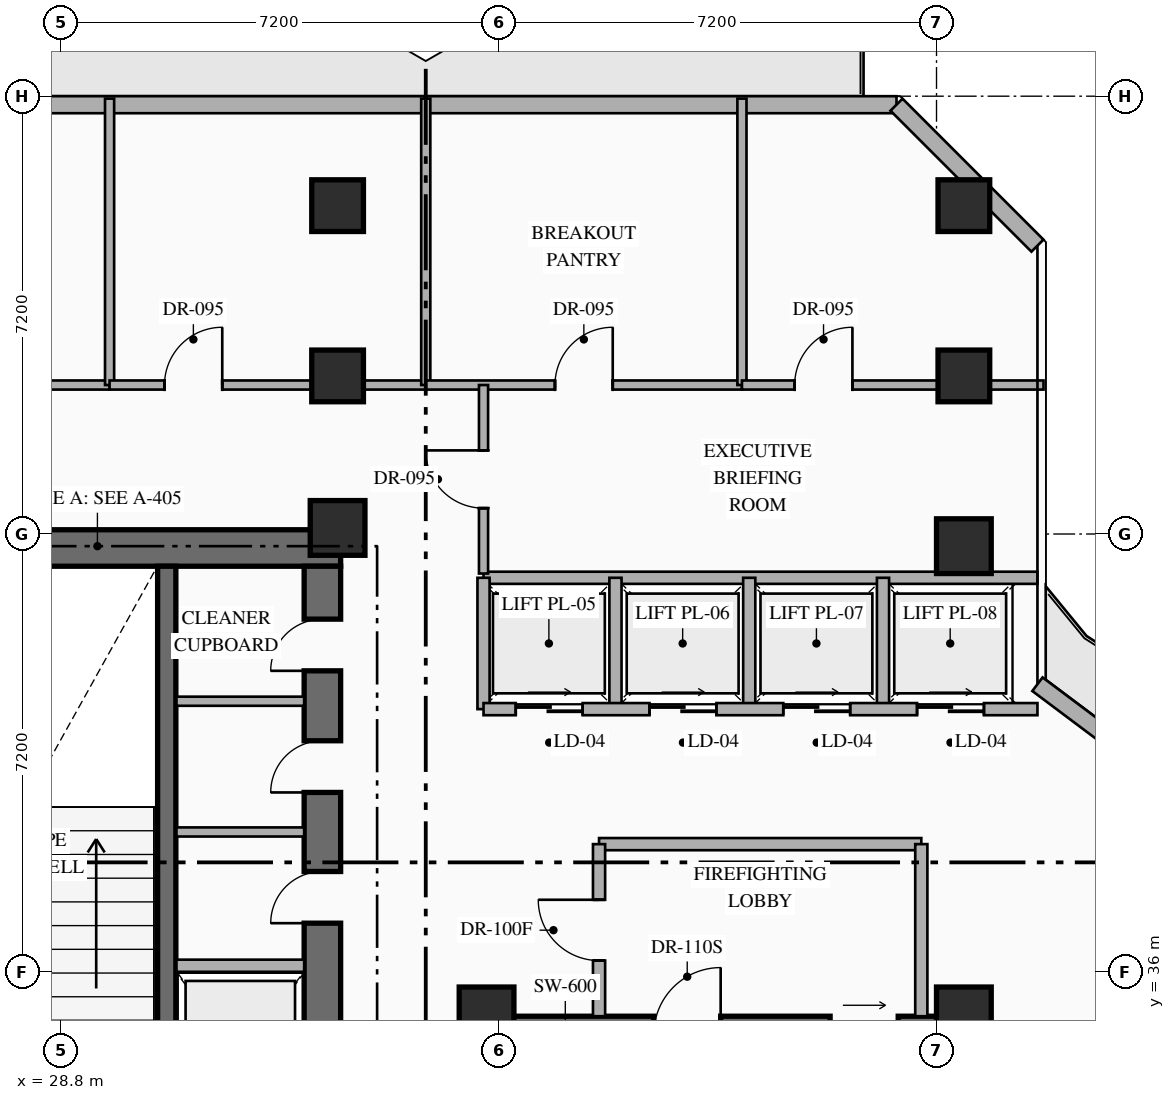
"""IFC4 building model, lengths in metres.
Left out: names, types, materials, properties, quantities, classifications, styles, units other than length and angle.
Written with IfcOpenShell. Run it as: python <this file> out.ifc"""

import sys

from ifc_helpers import new_model, si_unit, direction, frame, frame_2d, origin, origin_2d, place, context, subcontext, project, spatial, rectangle, hollow_rectangle, extrude, element, fill, save


model = new_model("IFC4")
c1 = context("Model", 3, precision=1e-05, world=origin(), true_north=direction((0.0, 1.0)))
c2 = subcontext(c1, "Body", "Model", "MODEL_VIEW")
j1 = project(units=[si_unit("LENGTHUNIT", "METRE"), si_unit("PLANEANGLEUNIT", "RADIAN")], contexts=[c1])
p1 = place(None, origin())
s1 = spatial("IfcSite", under=j1, at=p1, CompositionType="ELEMENT")
p2 = place(p1, origin())
s2 = spatial("IfcBuilding", under=s1, at=p2, CompositionType="ELEMENT")
p3 = place(p2, frame((0.0, 0.0, 149.25)))
s3 = spatial("IfcBuildingStorey", under=s2, at=p3, CompositionType="ELEMENT", Elevation=149.25)
p4 = place(p3, frame((25.62, 42.97, 0.0), z_axis=(0.0, 0.0, 1.0), x_axis=(1.0, 0.0, 0.0)))
e1 = element("IfcWall", 1, at=p4, inside=s3, PredefinedType="SHEAR", context=c2, shape_type="SweptSolid", body=[
    extrude(rectangle(XDim=7.78, YDim=0.6, at=frame_2d((3.89, 0.0))), origin(), (0.0, 0.0, 1.0), 3.6),
])
p5 = place(p3, frame((33.1, 33.19, 0.0), z_axis=(0.0, 0.0, 1.0), x_axis=(0.0, 1.0, 0.0)))
e2 = element("IfcWall", 2, at=p5, inside=s3, PredefinedType="SHEAR", context=c2, shape_type="SweptSolid", body=[
    extrude(rectangle(XDim=9.48, YDim=0.6, at=frame_2d((4.74, 0.0))), origin(), (0.0, 0.0, 1.0), 3.6),
])
p6 = place(p5, frame((3.61, 0.0, 0.0)))
e3 = element("IfcOpeningElement", 3, at=p6, cuts=e2, PredefinedType="OPENING", context=c2, shape_type="SweptSolid", body=[
    extrude(rectangle(XDim=0.85, YDim=2.08, at=frame_2d((0.425, 1.04))), frame((0.0, 0.31, 0.0), z_axis=(0.0, -1.0, 0.0), x_axis=(1.0, 0.0, 0.0)), (0.0, 0.0, 1.0), 0.62),
])
p7 = place(p5, frame((5.76, 0.0, 0.0)))
e4 = element("IfcOpeningElement", 4, at=p7, cuts=e2, PredefinedType="OPENING", context=c2, shape_type="SweptSolid", body=[
    extrude(rectangle(XDim=0.85, YDim=2.08, at=frame_2d((0.425, 1.04))), frame((0.0, 0.31, 0.0), z_axis=(0.0, -1.0, 0.0), x_axis=(1.0, 0.0, 0.0)), (0.0, 0.0, 1.0), 0.62),
])
p8 = place(p5, frame((7.76, 0.0, 0.0)))
e5 = element("IfcOpeningElement", 5, at=p8, cuts=e2, PredefinedType="OPENING", context=c2, shape_type="SweptSolid", body=[
    extrude(rectangle(XDim=0.85, YDim=2.08, at=frame_2d((0.425, 1.04))), frame((0.0, 0.31, 0.0), z_axis=(0.0, -1.0, 0.0), x_axis=(1.0, 0.0, 0.0)), (0.0, 0.0, 1.0), 0.62),
])
p9 = place(p3, frame((30.54, 33.19, 0.0), z_axis=(0.0, 0.0, 1.0), x_axis=(0.0, 1.0, 0.0)))
e6 = element("IfcWall", 6, at=p9, inside=s3, PredefinedType="SHEAR", context=c2, shape_type="SweptSolid", body=[
    extrude(rectangle(XDim=9.48, YDim=0.3, at=frame_2d((4.74, 0.0))), origin(), (0.0, 0.0, 1.0), 3.6),
])
p10 = place(p3, frame((35.89, 34.97, 0.0), z_axis=(0.0, 0.0, 1.0), x_axis=(1.0, 0.0, 0.0)))
e7 = element("IfcWall", 7, at=p10, inside=s3, PredefinedType="SHEAR", context=c2, shape_type="SweptSolid", body=[
    extrude(rectangle(XDim=7.76, YDim=0.6, at=frame_2d((3.88, 0.0))), origin(), (0.0, 0.0, 1.0), 3.6),
])
p11 = place(p10, frame((2.66, 0.0, 0.0)))
e8 = element("IfcOpeningElement", 8, at=p11, cuts=e7, PredefinedType="OPENING", context=c2, shape_type="SweptSolid", body=[
    extrude(rectangle(XDim=1.1, YDim=2.2, at=frame_2d((0.55, 1.1))), frame((0.0, 0.31, 0.0), z_axis=(0.0, -1.0, 0.0), x_axis=(1.0, 0.0, 0.0)), (0.0, 0.0, 1.0), 0.62),
])
p12 = place(p10, frame((5.56, 0.0, 0.0)))
e9 = element("IfcOpeningElement", 9, at=p12, cuts=e7, PredefinedType="OPENING", context=c2, shape_type="SweptSolid", body=[
    extrude(rectangle(XDim=1.12, YDim=2.15, at=frame_2d((0.56, 1.075))), frame((0.0, 0.31, 0.0), z_axis=(0.0, -1.0, 0.0), x_axis=(1.0, 0.0, 0.0)), (0.0, 0.0, 1.0), 0.62),
])
for number, where, z_axis, x_axis in (
    (10, (33.35, 43.3, 0.0), (0.0, 0.0, 1.0), (1.0, 0.0, 0.0)),
    (11, (35.8, 35.3, 0.0), (0.0, 0.0, 1.0), (1.0, 0.0, 0.0)),
    (12, (43.65, 35.3, 0.0), (0.0, 0.0, 1.0), (1.0, 0.0, 0.0)),
    (13, (43.65, 43.0, 0.0), (0.0, 0.0, 1.0), (1.0, 0.0, 0.0)),
):
    element("IfcColumn", number, at=place(p3, frame(where, z_axis=z_axis, x_axis=x_axis)), inside=s3, PredefinedType="COLUMN", context=c2, shape_type="SweptSolid", body=[
        extrude(rectangle(XDim=0.9, YDim=0.9, at=origin_2d()), origin(), (0.0, 0.0, 1.0), 3.6),
    ])
for number, where, z_axis, x_axis in (
    (14, (33.35, 45.8, 0.0), (0.0, 0.0, 1.0), (1.0, 0.0, 0.0)),
    (15, (43.65, 45.8, 0.0), (0.0, 0.0, 1.0), (1.0, 0.0, 0.0)),
    (16, (33.35, 48.6, 0.0), (0.0, 0.0, 1.0), (1.0, 0.0, 0.0)),
    (17, (43.65, 48.6, 0.0), (0.0, 0.0, 1.0), (1.0, 0.0, 0.0)),
):
    element("IfcColumn", number, at=place(p3, frame(where, z_axis=z_axis, x_axis=x_axis)), inside=s3, PredefinedType="COLUMN", context=c2, shape_type="SweptSolid", body=[
        extrude(hollow_rectangle(XDim=0.85, YDim=0.85, WallThickness=0.032, at=origin_2d()), origin(), (0.0, 0.0, 1.0), 3.6),
    ])
p13 = place(p3, frame((44.86, 40.73, 0.0), z_axis=(0.0, 0.0, 1.0), x_axis=(0.800007624502, -0.599989833863, 0.0)))
e18 = element("IfcWall", 18, at=p13, inside=s3, PredefinedType="STANDARD", context=c2, shape_type="SweptSolid", body=[
    extrude(rectangle(XDim=19.212, YDim=0.28, at=frame_2d((9.606, 0.0))), origin(), (0.0, 0.0, 1.0), 3.35),
])
p14 = place(p13, frame((1.755, 0.0, 0.0)))
e19 = element("IfcOpeningElement", 19, at=p14, cuts=e18, PredefinedType="OPENING", context=c2, shape_type="SweptSolid", body=[
    extrude(rectangle(XDim=1.1, YDim=2.2, at=frame_2d((0.55, 1.1))), frame((0.0, 0.15, 0.0), z_axis=(0.0, -1.0, 0.0), x_axis=(1.0, 0.0, 0.0)), (0.0, 0.0, 1.0), 0.3),
])
p15 = place(p13, frame((13.509, 0.0, 0.85)))
e20 = element("IfcOpeningElement", 20, at=p15, cuts=e18, PredefinedType="OPENING", context=c2, shape_type="SweptSolid", body=[
    extrude(rectangle(XDim=1.8, YDim=2.1, at=frame_2d((0.9, 1.05))), frame((0.0, 0.15, 0.0), z_axis=(0.0, -1.0, 0.0), x_axis=(1.0, 0.0, 0.0)), (0.0, 0.0, 1.0), 0.3),
])
p16 = place(p3, frame((12.058, 50.26, 0.0), z_axis=(0.0, 0.0, 1.0), x_axis=(1.0, 0.0, 0.0)))
e21 = element("IfcWall", 21, at=p16, inside=s3, PredefinedType="STANDARD", context=c2, shape_type="SweptSolid", body=[
    extrude(rectangle(XDim=30.484, YDim=0.28, at=frame_2d((15.242, 0.0))), origin(), (0.0, 0.0, 1.0), 3.35),
])
p17 = place(p16, frame((14.992, 0.0, 0.0)))
e22 = element("IfcOpeningElement", 22, at=p17, cuts=e21, PredefinedType="OPENING", context=c2, shape_type="SweptSolid", body=[
    extrude(rectangle(XDim=1.1, YDim=2.2, at=frame_2d((0.55, 1.1))), frame((0.0, 0.15, 0.0), z_axis=(0.0, -1.0, 0.0), x_axis=(1.0, 0.0, 0.0)), (0.0, 0.0, 1.0), 0.3),
])
p18 = place(p16, frame((10.074, 0.0, 0.85)))
e23 = element("IfcOpeningElement", 23, at=p18, cuts=e21, PredefinedType="OPENING", context=c2, shape_type="SweptSolid", body=[
    extrude(rectangle(XDim=1.8, YDim=2.1, at=frame_2d((0.9, 1.05))), frame((0.0, 0.15, 0.0), z_axis=(0.0, -1.0, 0.0), x_axis=(1.0, 0.0, 0.0)), (0.0, 0.0, 1.0), 0.3),
])
p19 = place(p3, frame((42.542, 50.26, 0.0), z_axis=(0.0, 0.0, 1.0), x_axis=(0.707106781187, -0.707106781187, 0.0)))
e24 = element("IfcWall", 24, at=p19, inside=s3, PredefinedType="STANDARD", context=c2, shape_type="SweptSolid", body=[
    extrude(rectangle(XDim=3.278, YDim=0.28, at=frame_2d((1.639, 0.0))), origin(), (0.0, 0.0, 1.0), 3.35),
])
p20 = place(p3, frame((30.7, 36.1, 0.0), z_axis=(0.0, 0.0, 1.0), x_axis=(1.0, 0.0, 0.0)))
e25 = element("IfcWall", 25, at=p20, inside=s3, PredefinedType="STANDARD", context=c2, shape_type="SweptSolid", body=[
    extrude(rectangle(XDim=2.1, YDim=0.2, at=frame_2d((1.05, 0.0))), origin(), (0.0, 0.0, 1.0), 3.35),
])
for number, where, z_axis, x_axis in (
    (26, (30.7, 38.3, 0.0), (0.0, 0.0, 1.0), (1.0, 0.0, 0.0)),
    (27, (30.7, 40.45, 0.0), (0.0, 0.0, 1.0), (1.0, 0.0, 0.0)),
):
    element("IfcWall", number, at=place(p3, frame(where, z_axis=z_axis, x_axis=x_axis)), inside=s3, PredefinedType="PARTITIONING", context=c2, shape_type="SweptSolid", body=[
        extrude(rectangle(XDim=2.1, YDim=0.15, at=frame_2d((1.05, 0.0))), origin(), (0.0, 0.0, 1.0), 3.35),
    ])
p21 = place(p3, frame((37.65, 38.1, 0.0), z_axis=(0.0, 0.0, 1.0), x_axis=(1.0, 0.0, 0.0)))
e28 = element("IfcWall", 28, at=p21, inside=s3, PredefinedType="STANDARD", context=c2, shape_type="SweptSolid", body=[
    extrude(rectangle(XDim=5.3, YDim=0.2, at=frame_2d((2.65, 0.0))), origin(), (0.0, 0.0, 1.0), 3.35),
])
p22 = place(p3, frame((42.95, 35.27, 0.0), z_axis=(0.0, 0.0, 1.0), x_axis=(0.0, 1.0, 0.0)))
e29 = element("IfcWall", 29, at=p22, inside=s3, PredefinedType="STANDARD", context=c2, shape_type="SweptSolid", body=[
    extrude(rectangle(XDim=2.83, YDim=0.2, at=frame_2d((1.415, 0.0))), origin(), (0.0, 0.0, 1.0), 3.35),
])
p23 = place(p3, frame((37.65, 35.27, 0.0), z_axis=(0.0, 0.0, 1.0), x_axis=(0.0, 1.0, 0.0)))
e30 = element("IfcWall", 30, at=p23, inside=s3, PredefinedType="STANDARD", context=c2, shape_type="SweptSolid", body=[
    extrude(rectangle(XDim=2.83, YDim=0.2, at=frame_2d((1.415, 0.0))), origin(), (0.0, 0.0, 1.0), 3.35),
])
p24 = place(p23, frame((0.915, 0.0, 0.0)))
e31 = element("IfcOpeningElement", 31, at=p24, cuts=e30, PredefinedType="OPENING", context=c2, shape_type="SweptSolid", body=[
    extrude(rectangle(XDim=1.0, YDim=2.2, at=frame_2d((0.5, 1.1))), frame((0.0, 0.11, 0.0), z_axis=(0.0, -1.0, 0.0), x_axis=(1.0, 0.0, 0.0)), (0.0, 0.0, 1.0), 0.22),
])
p25 = place(p3, frame((35.75, 42.48, 0.0), z_axis=(0.0, 0.0, 1.0), x_axis=(1.0, 0.0, 0.0)))
e32 = element("IfcWall", 32, at=p25, inside=s3, PredefinedType="STANDARD", context=c2, shape_type="SweptSolid", body=[
    extrude(rectangle(XDim=9.11, YDim=0.2, at=frame_2d((4.555, 0.0))), origin(), (0.0, 0.0, 1.0), 3.35),
])
for number, where, z_axis, x_axis in (
    (33, (35.75, 40.32, 0.0), (0.0, 0.0, 1.0), (0.0, 1.0, 0.0)),
    (34, (37.92, 40.32, 0.0), (0.0, 0.0, 1.0), (0.0, 1.0, 0.0)),
    (35, (40.12, 40.32, 0.0), (0.0, 0.0, 1.0), (0.0, 1.0, 0.0)),
    (36, (42.32, 40.32, 0.0), (0.0, 0.0, 1.0), (0.0, 1.0, 0.0)),
):
    element("IfcWall", number, at=place(p3, frame(where, z_axis=z_axis, x_axis=x_axis)), inside=s3, PredefinedType="STANDARD", context=c2, shape_type="SweptSolid", body=[
        extrude(rectangle(XDim=2.16, YDim=0.2, at=frame_2d((1.08, 0.0))), origin(), (0.0, 0.0, 1.0), 3.35),
    ])
p26 = place(p3, frame((35.75, 40.32, 0.0), z_axis=(0.0, 0.0, 1.0), x_axis=(1.0, 0.0, 0.0)))
e37 = element("IfcWall", 37, at=p26, inside=s3, PredefinedType="STANDARD", context=c2, shape_type="SweptSolid", body=[
    extrude(rectangle(XDim=9.11, YDim=0.2, at=frame_2d((4.555, 0.0))), origin(), (0.0, 0.0, 1.0), 3.35),
])
p27 = place(p26, frame((0.53, 0.0, 0.0)))
e38 = element("IfcOpeningElement", 38, at=p27, cuts=e37, PredefinedType="OPENING", context=c2, shape_type="SweptSolid", body=[
    extrude(rectangle(XDim=1.1, YDim=2.18, at=frame_2d((0.55, 1.09))), frame((0.0, 0.11, 0.0), z_axis=(0.0, -1.0, 0.0), x_axis=(1.0, 0.0, 0.0)), (0.0, 0.0, 1.0), 0.22),
])
p28 = place(p26, frame((2.73, 0.0, 0.0)))
e39 = element("IfcOpeningElement", 39, at=p28, cuts=e37, PredefinedType="OPENING", context=c2, shape_type="SweptSolid", body=[
    extrude(rectangle(XDim=1.1, YDim=2.18, at=frame_2d((0.55, 1.09))), frame((0.0, 0.11, 0.0), z_axis=(0.0, -1.0, 0.0), x_axis=(1.0, 0.0, 0.0)), (0.0, 0.0, 1.0), 0.22),
])
p29 = place(p26, frame((4.93, 0.0, 0.0)))
e40 = element("IfcOpeningElement", 40, at=p29, cuts=e37, PredefinedType="OPENING", context=c2, shape_type="SweptSolid", body=[
    extrude(rectangle(XDim=1.1, YDim=2.18, at=frame_2d((0.55, 1.09))), frame((0.0, 0.11, 0.0), z_axis=(0.0, -1.0, 0.0), x_axis=(1.0, 0.0, 0.0)), (0.0, 0.0, 1.0), 0.22),
])
p30 = place(p26, frame((7.13, 0.0, 0.0)))
e41 = element("IfcOpeningElement", 41, at=p30, cuts=e37, PredefinedType="OPENING", context=c2, shape_type="SweptSolid", body=[
    extrude(rectangle(XDim=1.1, YDim=2.18, at=frame_2d((0.55, 1.09))), frame((0.0, 0.11, 0.0), z_axis=(0.0, -1.0, 0.0), x_axis=(1.0, 0.0, 0.0)), (0.0, 0.0, 1.0), 0.22),
])
p31 = place(p3, frame((25.0, 45.65, 0.0), z_axis=(0.0, 0.0, 1.0), x_axis=(1.0, 0.0, 0.0)))
e42 = element("IfcWall", 42, at=p31, inside=s3, PredefinedType="PARTITIONING", context=c2, shape_type="SweptSolid", body=[
    extrude(rectangle(XDim=4.6, YDim=0.15, at=frame_2d((2.3, 0.0))), origin(), (0.0, 0.0, 1.0), 2.695),
])
p32 = place(p31, frame((2.403, 0.0, 0.0)))
e43 = element("IfcOpeningElement", 43, at=p32, cuts=e42, PredefinedType="OPENING", context=c2, shape_type="SweptSolid", body=[
    extrude(rectangle(XDim=0.95, YDim=2.15, at=frame_2d((0.475, 1.075))), frame((0.0, 0.085, 0.0), z_axis=(0.0, -1.0, 0.0), x_axis=(1.0, 0.0, 0.0)), (0.0, 0.0, 1.0), 0.17),
])
p33 = place(p3, frame((29.6, 45.65, 0.0), z_axis=(0.0, 0.0, 1.0), x_axis=(0.0, 1.0, 0.0)))
e44 = element("IfcWall", 44, at=p33, inside=s3, PredefinedType="PARTITIONING", context=c2, shape_type="SweptSolid", body=[
    extrude(rectangle(XDim=4.71, YDim=0.15, at=frame_2d((2.355, 0.0))), origin(), (0.0, 0.0, 1.0), 3.35),
])
p34 = place(p3, frame((29.6, 45.65, 0.0), z_axis=(0.0, 0.0, 1.0), x_axis=(1.0, 0.0, 0.0)))
e45 = element("IfcWall", 45, at=p34, inside=s3, PredefinedType="PARTITIONING", context=c2, shape_type="SweptSolid", body=[
    extrude(rectangle(XDim=5.2, YDim=0.15, at=frame_2d((2.6, 0.0))), origin(), (0.0, 0.0, 1.0), 2.695),
])
p35 = place(p34, frame((0.903, 0.0, 0.0)))
e46 = element("IfcOpeningElement", 46, at=p35, cuts=e45, PredefinedType="OPENING", context=c2, shape_type="SweptSolid", body=[
    extrude(rectangle(XDim=0.95, YDim=2.15, at=frame_2d((0.475, 1.075))), frame((0.0, 0.085, 0.0), z_axis=(0.0, -1.0, 0.0), x_axis=(1.0, 0.0, 0.0)), (0.0, 0.0, 1.0), 0.17),
])
p36 = place(p3, frame((34.8, 45.65, 0.0), z_axis=(0.0, 0.0, 1.0), x_axis=(0.0, 1.0, 0.0)))
e47 = element("IfcWall", 47, at=p36, inside=s3, PredefinedType="PARTITIONING", context=c2, shape_type="SweptSolid", body=[
    extrude(rectangle(XDim=4.71, YDim=0.15, at=frame_2d((2.355, 0.0))), origin(), (0.0, 0.0, 1.0), 3.35),
])
p37 = place(p3, frame((34.8, 45.65, 0.0), z_axis=(0.0, 0.0, 1.0), x_axis=(1.0, 0.0, 0.0)))
e48 = element("IfcWall", 48, at=p37, inside=s3, PredefinedType="PARTITIONING", context=c2, shape_type="SweptSolid", body=[
    extrude(rectangle(XDim=5.2, YDim=0.15, at=frame_2d((2.6, 0.0))), origin(), (0.0, 0.0, 1.0), 2.695),
])
p38 = place(p37, frame((2.125, 0.0, 0.0)))
e49 = element("IfcOpeningElement", 49, at=p38, cuts=e48, PredefinedType="OPENING", context=c2, shape_type="SweptSolid", body=[
    extrude(rectangle(XDim=0.95, YDim=2.15, at=frame_2d((0.475, 1.075))), frame((0.0, 0.085, 0.0), z_axis=(0.0, -1.0, 0.0), x_axis=(1.0, 0.0, 0.0)), (0.0, 0.0, 1.0), 0.17),
])
p39 = place(p3, frame((40.0, 45.65, 0.0), z_axis=(0.0, 0.0, 1.0), x_axis=(0.0, 1.0, 0.0)))
e50 = element("IfcWall", 50, at=p39, inside=s3, PredefinedType="PARTITIONING", context=c2, shape_type="SweptSolid", body=[
    extrude(rectangle(XDim=4.71, YDim=0.15, at=frame_2d((2.355, 0.0))), origin(), (0.0, 0.0, 1.0), 3.35),
])
p40 = place(p3, frame((40.0, 45.65, 0.0), z_axis=(0.0, 0.0, 1.0), x_axis=(1.0, 0.0, 0.0)))
e51 = element("IfcWall", 51, at=p40, inside=s3, PredefinedType="PARTITIONING", context=c2, shape_type="SweptSolid", body=[
    extrude(rectangle(XDim=4.96, YDim=0.15, at=frame_2d((2.48, 0.0))), origin(), (0.0, 0.0, 1.0), 2.695),
])
p41 = place(p40, frame((0.867, 0.0, 0.0)))
e52 = element("IfcOpeningElement", 52, at=p41, cuts=e51, PredefinedType="OPENING", context=c2, shape_type="SweptSolid", body=[
    extrude(rectangle(XDim=0.95, YDim=2.15, at=frame_2d((0.475, 1.075))), frame((0.0, 0.085, 0.0), z_axis=(0.0, -1.0, 0.0), x_axis=(1.0, 0.0, 0.0)), (0.0, 0.0, 1.0), 0.17),
])
p42 = place(p3, frame((43.63, 31.973, 0.0), z_axis=(0.0, 0.0, 1.0), x_axis=(0.599975099311, 0.800018674911, 0.0)))
e53 = element("IfcWall", 53, at=p42, inside=s3, PredefinedType="PARTITIONING", context=c2, shape_type="SweptSolid", body=[
    extrude(rectangle(XDim=7.844, YDim=0.15, at=frame_2d((3.922, 0.0))), origin(), (0.0, 0.0, 1.0), 3.35),
])
p43 = place(p3, frame((35.75, 42.55, 0.0), z_axis=(0.0, 0.0, 1.0), x_axis=(0.0, 1.0, 0.0)))
e54 = element("IfcWall", 54, at=p43, inside=s3, PredefinedType="PARTITIONING", context=c2, shape_type="SweptSolid", body=[
    extrude(rectangle(XDim=3.1, YDim=0.15, at=frame_2d((1.55, 0.0))), origin(), (0.0, 0.0, 1.0), 3.35),
])
p44 = place(p43, frame((1.075, 0.0, 0.0)))
e55 = element("IfcOpeningElement", 55, at=p44, cuts=e54, PredefinedType="OPENING", context=c2, shape_type="SweptSolid", body=[
    extrude(rectangle(XDim=0.95, YDim=2.15, at=frame_2d((0.475, 1.075))), frame((0.0, 0.085, 0.0), z_axis=(0.0, -1.0, 0.0), x_axis=(1.0, 0.0, 0.0)), (0.0, 0.0, 1.0), 0.17),
])
p45 = place(p6, origin())
e56 = element("IfcDoor", 56, at=p45, inside=s3, OperationType="SINGLE_SWING_LEFT", PredefinedType="DOOR", context=c2, shape_type="SweptSolid", body=[
    extrude(rectangle(XDim=0.85, YDim=2.08, at=frame_2d((0.425, 1.04))), frame((0.0, 0.025, 0.0), z_axis=(0.0, -1.0, 0.0), x_axis=(1.0, 0.0, 0.0)), (0.0, 0.0, 1.0), 0.05),
])
fill(e3, e56)
p46 = place(p7, origin())
e57 = element("IfcDoor", 57, at=p46, inside=s3, OperationType="SINGLE_SWING_LEFT", PredefinedType="DOOR", context=c2, shape_type="SweptSolid", body=[
    extrude(rectangle(XDim=0.85, YDim=2.08, at=frame_2d((0.425, 1.04))), frame((0.0, 0.025, 0.0), z_axis=(0.0, -1.0, 0.0), x_axis=(1.0, 0.0, 0.0)), (0.0, 0.0, 1.0), 0.05),
])
fill(e4, e57)
p47 = place(p8, origin())
e58 = element("IfcDoor", 58, at=p47, inside=s3, OperationType="SINGLE_SWING_LEFT", PredefinedType="DOOR", context=c2, shape_type="SweptSolid", body=[
    extrude(rectangle(XDim=0.85, YDim=2.08, at=frame_2d((0.425, 1.04))), frame((0.0, 0.025, 0.0), z_axis=(0.0, -1.0, 0.0), x_axis=(1.0, 0.0, 0.0)), (0.0, 0.0, 1.0), 0.05),
])
fill(e5, e58)
p48 = place(p24, origin())
e59 = element("IfcDoor", 59, at=p48, inside=s3, OperationType="SINGLE_SWING_RIGHT", PredefinedType="DOOR", context=c2, shape_type="SweptSolid", body=[
    extrude(rectangle(XDim=1.0, YDim=2.2, at=frame_2d((0.5, 1.1))), frame((0.0, 0.025, 0.0), z_axis=(0.0, -1.0, 0.0), x_axis=(1.0, 0.0, 0.0)), (0.0, 0.0, 1.0), 0.05),
])
fill(e31, e59)
p49 = place(p27, origin())
e60 = element("IfcDoor", 60, at=p49, inside=s3, OperationType="SLIDING_TO_RIGHT", PredefinedType="USERDEFINED", context=c2, shape_type="SweptSolid", body=[
    extrude(rectangle(XDim=1.1, YDim=2.18, at=frame_2d((0.55, 1.09))), frame((0.0, 0.025, 0.0), z_axis=(0.0, -1.0, 0.0), x_axis=(1.0, 0.0, 0.0)), (0.0, 0.0, 1.0), 0.05),
])
fill(e38, e60)
p50 = place(p28, origin())
e61 = element("IfcDoor", 61, at=p50, inside=s3, OperationType="SLIDING_TO_RIGHT", PredefinedType="USERDEFINED", context=c2, shape_type="SweptSolid", body=[
    extrude(rectangle(XDim=1.1, YDim=2.18, at=frame_2d((0.55, 1.09))), frame((0.0, 0.025, 0.0), z_axis=(0.0, -1.0, 0.0), x_axis=(1.0, 0.0, 0.0)), (0.0, 0.0, 1.0), 0.05),
])
fill(e39, e61)
p51 = place(p29, origin())
e62 = element("IfcDoor", 62, at=p51, inside=s3, OperationType="SLIDING_TO_RIGHT", PredefinedType="USERDEFINED", context=c2, shape_type="SweptSolid", body=[
    extrude(rectangle(XDim=1.1, YDim=2.18, at=frame_2d((0.55, 1.09))), frame((0.0, 0.025, 0.0), z_axis=(0.0, -1.0, 0.0), x_axis=(1.0, 0.0, 0.0)), (0.0, 0.0, 1.0), 0.05),
])
fill(e40, e62)
p52 = place(p30, origin())
e63 = element("IfcDoor", 63, at=p52, inside=s3, OperationType="SLIDING_TO_RIGHT", PredefinedType="USERDEFINED", context=c2, shape_type="SweptSolid", body=[
    extrude(rectangle(XDim=1.1, YDim=2.18, at=frame_2d((0.55, 1.09))), frame((0.0, 0.025, 0.0), z_axis=(0.0, -1.0, 0.0), x_axis=(1.0, 0.0, 0.0)), (0.0, 0.0, 1.0), 0.05),
])
fill(e41, e63)
p53 = place(p35, origin())
e64 = element("IfcDoor", 64, at=p53, inside=s3, OperationType="SINGLE_SWING_RIGHT", PredefinedType="DOOR", context=c2, shape_type="SweptSolid", body=[
    extrude(rectangle(XDim=0.95, YDim=2.15, at=frame_2d((0.475, 1.075))), frame((0.0, 0.025, 0.0), z_axis=(0.0, -1.0, 0.0), x_axis=(1.0, 0.0, 0.0)), (0.0, 0.0, 1.0), 0.05),
])
fill(e46, e64)
p54 = place(p38, origin())
e65 = element("IfcDoor", 65, at=p54, inside=s3, OperationType="SINGLE_SWING_RIGHT", PredefinedType="DOOR", context=c2, shape_type="SweptSolid", body=[
    extrude(rectangle(XDim=0.95, YDim=2.15, at=frame_2d((0.475, 1.075))), frame((0.0, 0.025, 0.0), z_axis=(0.0, -1.0, 0.0), x_axis=(1.0, 0.0, 0.0)), (0.0, 0.0, 1.0), 0.05),
])
fill(e49, e65)
p55 = place(p41, origin())
e66 = element("IfcDoor", 66, at=p55, inside=s3, OperationType="SINGLE_SWING_RIGHT", PredefinedType="DOOR", context=c2, shape_type="SweptSolid", body=[
    extrude(rectangle(XDim=0.95, YDim=2.15, at=frame_2d((0.475, 1.075))), frame((0.0, 0.025, 0.0), z_axis=(0.0, -1.0, 0.0), x_axis=(1.0, 0.0, 0.0)), (0.0, 0.0, 1.0), 0.05),
])
fill(e52, e66)
p56 = place(p44, origin())
e67 = element("IfcDoor", 67, at=p56, inside=s3, OperationType="SINGLE_SWING_RIGHT", PredefinedType="DOOR", context=c2, shape_type="SweptSolid", body=[
    extrude(rectangle(XDim=0.95, YDim=2.15, at=frame_2d((0.475, 1.075))), frame((0.0, 0.025, 0.0), z_axis=(0.0, -1.0, 0.0), x_axis=(1.0, 0.0, 0.0)), (0.0, 0.0, 1.0), 0.05),
])
fill(e55, e67)
save(model, sys.argv[1])
